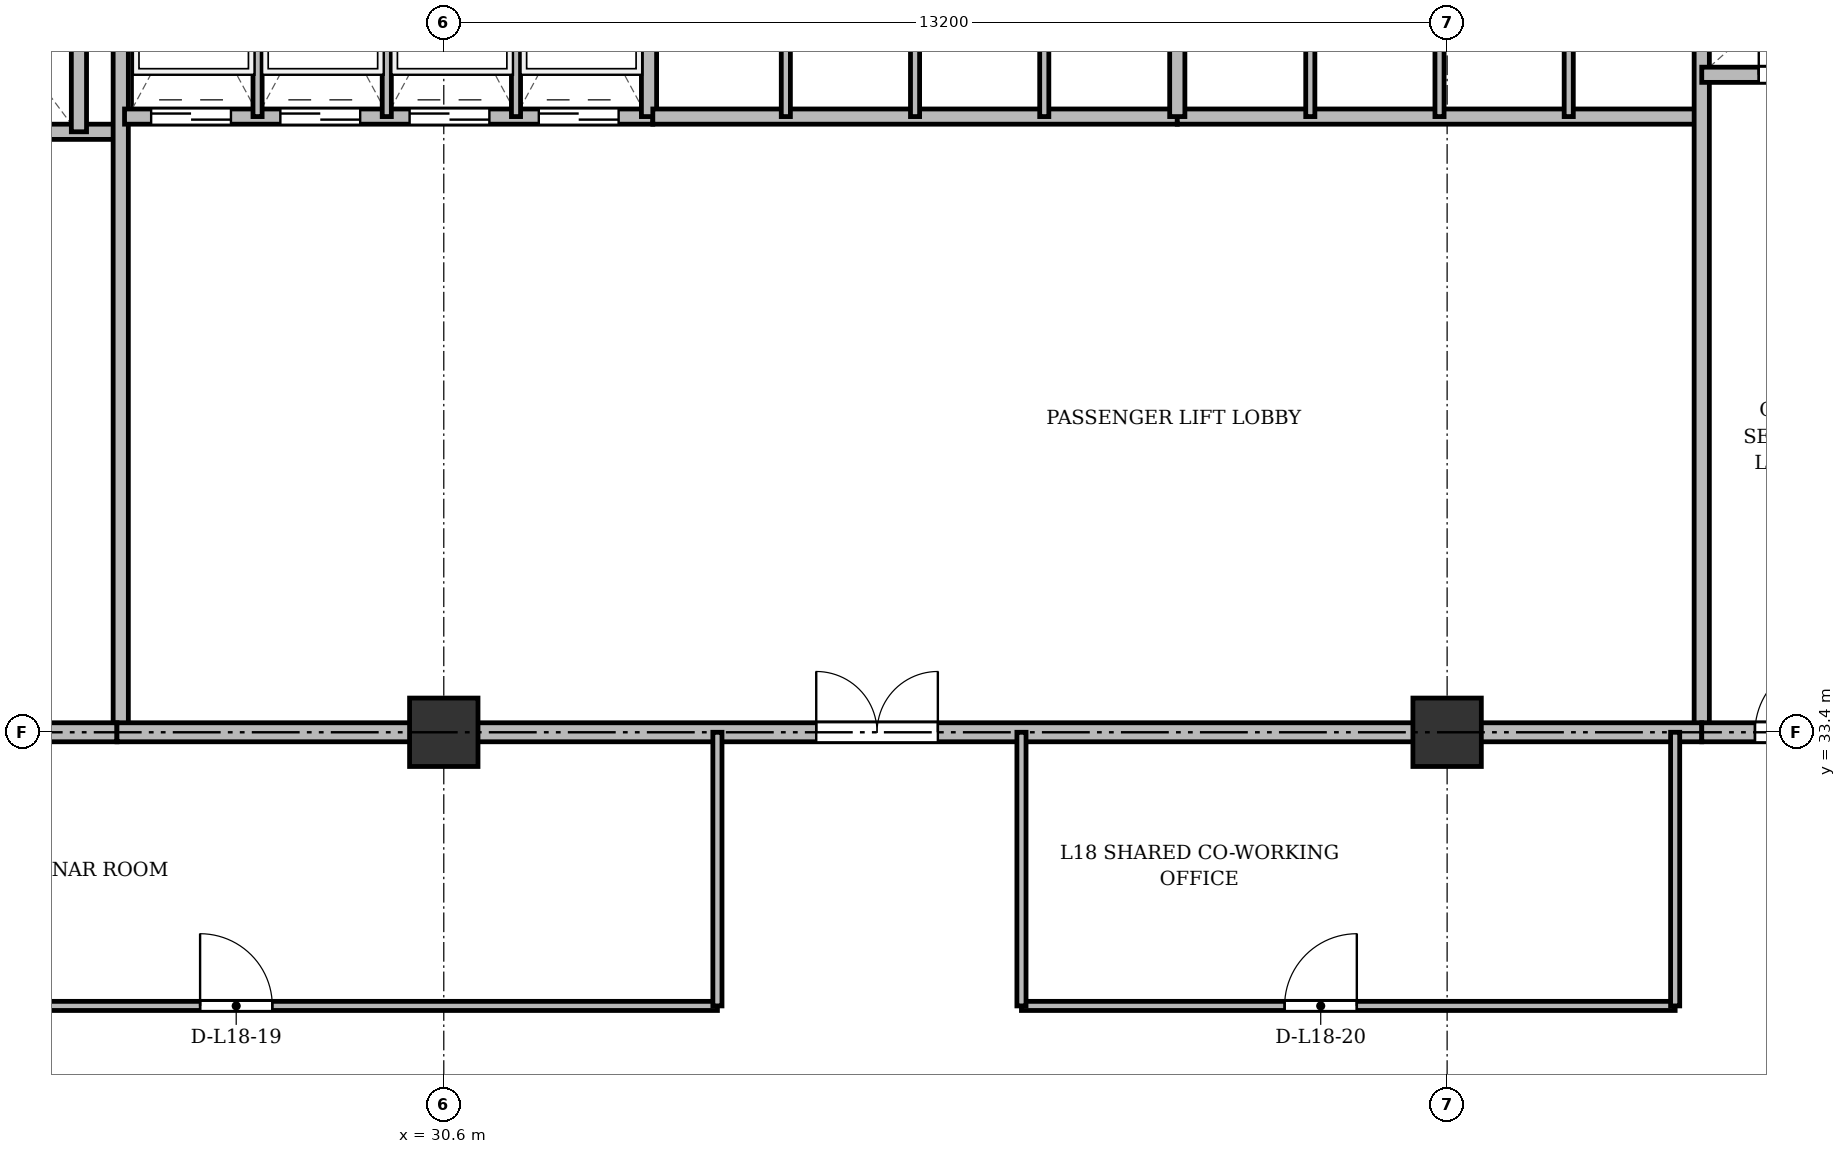
"""IFC4 building model, lengths in metres.
Left out: names, types, materials, properties, quantities, classifications, styles, units other than length and angle.
Written with IfcOpenShell. Run it as: python <this file> out.ifc"""

import sys

from ifc_helpers import new_model, si_unit, direction, frame, frame_2d, origin, origin_2d, place, context, subcontext, project, spatial, rectangle, extrude, source, transform, mapped, element, fill, save


model = new_model("IFC4")
c1 = context("Model", 3, precision=1e-05, world=origin(), true_north=direction((0.0, 1.0)))
c2 = subcontext(c1, "Body", "Model", "MODEL_VIEW")
j1 = project(units=[si_unit("LENGTHUNIT", "METRE"), si_unit("PLANEANGLEUNIT", "RADIAN")], contexts=[c1])
p1 = place(None, origin())
s1 = spatial("IfcSite", under=j1, at=p1, CompositionType="ELEMENT")
p2 = place(p1, origin())
s2 = spatial("IfcBuilding", under=s1, at=p2, CompositionType="ELEMENT")
p3 = place(p2, frame((0.0, 0.0, 70.3)))
s3 = spatial("IfcBuildingStorey", under=s2, at=p3, CompositionType="ELEMENT", Elevation=70.3)
m1 = source(origin(), c2, "Body", "SweptSolid", [
    extrude(rectangle(XDim=0.9, YDim=0.9, at=origin_2d()), origin(), (0.0, 0.0, 1.0), 3.6),
])
for number, where, z_axis, x_axis in (
    (1, (30.6, 33.4, 0.0), (0.0, 0.0, 1.0), (1.0, 0.0, 0.0)),
    (2, (43.8, 33.4, 0.0), (0.0, 0.0, 1.0), (1.0, 0.0, 0.0)),
):
    element("IfcColumn", number, at=place(p3, frame(where, z_axis=z_axis, x_axis=x_axis)), inside=s3, PredefinedType="COLUMN", context=c2, shape_type="MappedRepresentation", body=[
        mapped(m1, transform((0.0, 0.0, 0.0), x_axis=(1.0, 0.0, 0.0), y_axis=(0.0, 1.0, 0.0), z_axis=(0.0, 0.0, 1.0), scale=1.0)),
    ])
p4 = place(p3, frame((19.55, 41.3, 0.0), z_axis=(0.0, 0.0, 1.0), x_axis=(1.0, 0.0, 0.0)))
e3 = element("IfcWall", 3, at=p4, inside=s3, PredefinedType="SOLIDWALL", context=c2, shape_type="SweptSolid", body=[
    extrude(rectangle(XDim=6.75, YDim=0.2, at=frame_2d((3.375, 0.0))), origin(), (0.0, 0.0, 1.0), 3.22),
])
p5 = place(p4, frame((1.7, 0.0, 0.0)))
e4 = element("IfcOpeningElement", 4, at=p5, cuts=e3, PredefinedType="OPENING", context=c2, shape_type="SweptSolid", body=[
    extrude(rectangle(XDim=1.1, YDim=2.15, at=frame_2d((0.55, 1.075))), frame((0.0, 0.11, 0.0), z_axis=(0.0, -1.0, 0.0), x_axis=(1.0, 0.0, 0.0)), (0.0, 0.0, 1.0), 0.22),
])
p6 = place(p4, frame((4.4, 0.0, 0.0)))
e5 = element("IfcOpeningElement", 5, at=p6, cuts=e3, PredefinedType="OPENING", context=c2, shape_type="SweptSolid", body=[
    extrude(rectangle(XDim=1.1, YDim=2.15, at=frame_2d((0.55, 1.075))), frame((0.0, 0.11, 0.0), z_axis=(0.0, -1.0, 0.0), x_axis=(1.0, 0.0, 0.0)), (0.0, 0.0, 1.0), 0.22),
])
p7 = place(p3, frame((25.8, 41.3, 0.0), z_axis=(0.0, 0.0, 1.0), x_axis=(0.0, 1.0, 0.0)))
e6 = element("IfcWall", 6, at=p7, inside=s3, PredefinedType="SOLIDWALL", context=c2, shape_type="SweptSolid", body=[
    extrude(rectangle(XDim=3.4, YDim=0.2, at=frame_2d((1.7, 0.0))), origin(), (0.0, 0.0, 1.0), 3.22),
])
p8 = place(p3, frame((26.35, 33.4, 0.0), z_axis=(0.0, 0.0, 1.0), x_axis=(0.0, 1.0, 0.0)))
e7 = element("IfcWall", 7, at=p8, inside=s3, PredefinedType="SOLIDWALL", context=c2, shape_type="SweptSolid", body=[
    extrude(rectangle(XDim=11.3, YDim=0.2, at=frame_2d((5.65, 0.0))), origin(), (0.0, 0.0, 1.0), 2.57),
])
p9 = place(p3, frame((19.5, 33.4, 0.0), z_axis=(0.0, 0.0, 1.0), x_axis=(1.0, 0.0, 0.0)))
e8 = element("IfcWall", 8, at=p9, inside=s3, PredefinedType="PARTITIONING", context=c2, shape_type="SweptSolid", body=[
    extrude(rectangle(XDim=6.8, YDim=0.25, at=frame_2d((3.4, 0.0))), origin(), (0.0, 0.0, 1.0), 2.57),
])
p10 = place(p9, frame((0.75, 0.0, 0.0)))
e9 = element("IfcOpeningElement", 9, at=p10, cuts=e8, PredefinedType="OPENING", context=c2, shape_type="SweptSolid", body=[
    extrude(rectangle(XDim=1.6, YDim=2.2, at=frame_2d((0.8, 1.1))), frame((0.0, 0.135, 0.0), z_axis=(0.0, -1.0, 0.0), x_axis=(1.0, 0.0, 0.0)), (0.0, 0.0, 1.0), 0.27),
])
p11 = place(p3, frame((26.4, 41.5, 0.0), z_axis=(0.0, 0.0, 1.0), x_axis=(1.0, 0.0, 0.0)))
e10 = element("IfcWall", 10, at=p11, inside=s3, PredefinedType="SOLIDWALL", context=c2, shape_type="SweptSolid", body=[
    extrude(rectangle(XDim=6.95, YDim=0.2, at=frame_2d((3.475, 0.0))), origin(), (0.0, 0.0, 1.0), 3.22),
])
p12 = place(p11, frame((0.35, 0.0, 0.0)))
e11 = element("IfcOpeningElement", 11, at=p12, cuts=e10, PredefinedType="OPENING", context=c2, shape_type="SweptSolid", body=[
    extrude(rectangle(XDim=1.05, YDim=2.15, at=frame_2d((0.525, 1.075))), frame((0.0, 0.11, 0.0), z_axis=(0.0, -1.0, 0.0), x_axis=(1.0, 0.0, 0.0)), (0.0, 0.0, 1.0), 0.22),
])
p13 = place(p11, frame((2.05, 0.0, 0.0)))
e12 = element("IfcOpeningElement", 12, at=p13, cuts=e10, PredefinedType="OPENING", context=c2, shape_type="SweptSolid", body=[
    extrude(rectangle(XDim=1.05, YDim=2.15, at=frame_2d((0.525, 1.075))), frame((0.0, 0.11, 0.0), z_axis=(0.0, -1.0, 0.0), x_axis=(1.0, 0.0, 0.0)), (0.0, 0.0, 1.0), 0.22),
])
p14 = place(p11, frame((3.75, 0.0, 0.0)))
e13 = element("IfcOpeningElement", 13, at=p14, cuts=e10, PredefinedType="OPENING", context=c2, shape_type="SweptSolid", body=[
    extrude(rectangle(XDim=1.05, YDim=2.15, at=frame_2d((0.525, 1.075))), frame((0.0, 0.11, 0.0), z_axis=(0.0, -1.0, 0.0), x_axis=(1.0, 0.0, 0.0)), (0.0, 0.0, 1.0), 0.22),
])
p15 = place(p11, frame((5.45, 0.0, 0.0)))
e14 = element("IfcOpeningElement", 14, at=p15, cuts=e10, PredefinedType="OPENING", context=c2, shape_type="SweptSolid", body=[
    extrude(rectangle(XDim=1.05, YDim=2.15, at=frame_2d((0.525, 1.075))), frame((0.0, 0.11, 0.0), z_axis=(0.0, -1.0, 0.0), x_axis=(1.0, 0.0, 0.0)), (0.0, 0.0, 1.0), 0.22),
])
p16 = place(p3, frame((33.3, 41.5, 0.0), z_axis=(0.0, 0.0, 1.0), x_axis=(0.0, 1.0, 0.0)))
e15 = element("IfcWall", 15, at=p16, inside=s3, PredefinedType="SOLIDWALL", context=c2, shape_type="SweptSolid", body=[
    extrude(rectangle(XDim=3.2, YDim=0.2, at=frame_2d((1.6, 0.0))), origin(), (0.0, 0.0, 1.0), 3.22),
])
for number, where, z_axis, x_axis in (
    (16, (28.15, 41.5, 0.0), (0.0, 0.0, 1.0), (0.0, 1.0, 0.0)),
    (17, (29.85, 41.5, 0.0), (0.0, 0.0, 1.0), (0.0, 1.0, 0.0)),
    (18, (31.55, 41.5, 0.0), (0.0, 0.0, 1.0), (0.0, 1.0, 0.0)),
):
    element("IfcWall", number, at=place(p3, frame(where, z_axis=z_axis, x_axis=x_axis)), inside=s3, PredefinedType="PARTITIONING", context=c2, shape_type="SweptSolid", body=[
        extrude(rectangle(XDim=3.2, YDim=0.12, at=frame_2d((1.6, 0.0))), origin(), (0.0, 0.0, 1.0), 3.22),
    ])
p17 = place(p3, frame((33.35, 41.5, 0.0), z_axis=(0.0, 0.0, 1.0), x_axis=(1.0, 0.0, 0.0)))
e19 = element("IfcWall", 19, at=p17, inside=s3, PredefinedType="SOLIDWALL", context=c2, shape_type="SweptSolid", body=[
    extrude(rectangle(XDim=6.9, YDim=0.2, at=frame_2d((3.45, 0.0))), origin(), (0.0, 0.0, 1.0), 3.22),
])
for number, where, z_axis, x_axis in (
    (20, (35.1, 41.5, 0.0), (0.0, 0.0, 1.0), (0.0, 1.0, 0.0)),
    (21, (36.8, 41.5, 0.0), (0.0, 0.0, 1.0), (0.0, 1.0, 0.0)),
    (22, (38.5, 41.5, 0.0), (0.0, 0.0, 1.0), (0.0, 1.0, 0.0)),
):
    element("IfcWall", number, at=place(p3, frame(where, z_axis=z_axis, x_axis=x_axis)), inside=s3, PredefinedType="PARTITIONING", context=c2, shape_type="SweptSolid", body=[
        extrude(rectangle(XDim=3.2, YDim=0.12, at=frame_2d((1.6, 0.0))), origin(), (0.0, 0.0, 1.0), 3.22),
    ])
p18 = place(p3, frame((40.25, 41.5, 0.0), z_axis=(0.0, 0.0, 1.0), x_axis=(1.0, 0.0, 0.0)))
e23 = element("IfcWall", 23, at=p18, inside=s3, PredefinedType="SOLIDWALL", context=c2, shape_type="SweptSolid", body=[
    extrude(rectangle(XDim=6.9, YDim=0.2, at=frame_2d((3.45, 0.0))), origin(), (0.0, 0.0, 1.0), 2.632),
])
p19 = place(p3, frame((40.25, 41.5, 0.0), z_axis=(0.0, 0.0, 1.0), x_axis=(0.0, 1.0, 0.0)))
e24 = element("IfcWall", 24, at=p19, inside=s3, PredefinedType="SOLIDWALL", context=c2, shape_type="SweptSolid", body=[
    extrude(rectangle(XDim=3.2, YDim=0.2, at=frame_2d((1.6, 0.0))), origin(), (0.0, 0.0, 1.0), 3.22),
])
p20 = place(p3, frame((42.0, 41.5, 0.0), z_axis=(0.0, 0.0, 1.0), x_axis=(0.0, 1.0, 0.0)))
e25 = element("IfcWall", 25, at=p20, inside=s3, PredefinedType="PARTITIONING", context=c2, shape_type="SweptSolid", body=[
    extrude(rectangle(XDim=3.2, YDim=0.12, at=frame_2d((1.6, 0.0))), origin(), (0.0, 0.0, 1.0), 3.22),
])
p21 = place(p3, frame((43.7, 41.5, 0.0), z_axis=(0.0, 0.0, 1.0), x_axis=(0.0, 1.0, 0.0)))
e26 = element("IfcWall", 26, at=p21, inside=s3, PredefinedType="PARTITIONING", context=c2, shape_type="SweptSolid", body=[
    extrude(rectangle(XDim=3.2, YDim=0.12, at=frame_2d((1.6, 0.0))), origin(), (0.0, 0.0, 1.0), 2.632),
])
p22 = place(p3, frame((45.4, 41.5, 0.0), z_axis=(0.0, 0.0, 1.0), x_axis=(0.0, 1.0, 0.0)))
e27 = element("IfcWall", 27, at=p22, inside=s3, PredefinedType="PARTITIONING", context=c2, shape_type="SweptSolid", body=[
    extrude(rectangle(XDim=3.2, YDim=0.12, at=frame_2d((1.6, 0.0))), origin(), (0.0, 0.0, 1.0), 3.22),
])
p23 = place(p3, frame((47.15, 33.4, 0.0), z_axis=(0.0, 0.0, 1.0), x_axis=(0.0, 1.0, 0.0)))
e28 = element("IfcWall", 28, at=p23, inside=s3, PredefinedType="SOLIDWALL", context=c2, shape_type="SweptSolid", body=[
    extrude(rectangle(XDim=11.3, YDim=0.2, at=frame_2d((5.65, 0.0))), origin(), (0.0, 0.0, 1.0), 2.57),
])
p24 = place(p3, frame((26.3, 33.4, 0.0), z_axis=(0.0, 0.0, 1.0), x_axis=(1.0, 0.0, 0.0)))
e29 = element("IfcWall", 29, at=p24, inside=s3, PredefinedType="PARTITIONING", context=c2, shape_type="SweptSolid", body=[
    extrude(rectangle(XDim=20.85, YDim=0.25, at=frame_2d((10.425, 0.0))), origin(), (0.0, 0.0, 1.0), 2.57),
])
p25 = place(p24, frame((9.2, 0.0, 0.0)))
e30 = element("IfcOpeningElement", 30, at=p25, cuts=e29, PredefinedType="OPENING", context=c2, shape_type="SweptSolid", body=[
    extrude(rectangle(XDim=1.6, YDim=2.2, at=frame_2d((0.8, 1.1))), frame((0.0, 0.135, 0.0), z_axis=(0.0, -1.0, 0.0), x_axis=(1.0, 0.0, 0.0)), (0.0, 0.0, 1.0), 0.27),
])
p26 = place(p3, frame((47.15, 42.05, 0.0), z_axis=(0.0, 0.0, 1.0), x_axis=(1.0, 0.0, 0.0)))
e31 = element("IfcWall", 31, at=p26, inside=s3, PredefinedType="SOLIDWALL", context=c2, shape_type="SweptSolid", body=[
    extrude(rectangle(XDim=7.85, YDim=0.2, at=frame_2d((3.925, 0.0))), origin(), (0.0, 0.0, 1.0), 2.632),
])
p27 = place(p26, frame((0.75, 0.0, 0.0)))
e32 = element("IfcOpeningElement", 32, at=p27, cuts=e31, PredefinedType="OPENING", context=c2, shape_type="SweptSolid", body=[
    extrude(rectangle(XDim=0.9, YDim=2.1, at=frame_2d((0.45, 1.05))), frame((0.0, 0.11, 0.0), z_axis=(0.0, -1.0, 0.0), x_axis=(1.0, 0.0, 0.0)), (0.0, 0.0, 1.0), 0.22),
])
p28 = place(p26, frame((3.85, 0.0, 0.0)))
e33 = element("IfcOpeningElement", 33, at=p28, cuts=e31, PredefinedType="OPENING", context=c2, shape_type="SweptSolid", body=[
    extrude(rectangle(XDim=0.9, YDim=2.1, at=frame_2d((0.45, 1.05))), frame((0.0, 0.11, 0.0), z_axis=(0.0, -1.0, 0.0), x_axis=(1.0, 0.0, 0.0)), (0.0, 0.0, 1.0), 0.22),
])
p29 = place(p3, frame((47.15, 33.4, 0.0), z_axis=(0.0, 0.0, 1.0), x_axis=(1.0, 0.0, 0.0)))
e34 = element("IfcWall", 34, at=p29, inside=s3, PredefinedType="PARTITIONING", context=c2, shape_type="SweptSolid", body=[
    extrude(rectangle(XDim=11.15, YDim=0.25, at=frame_2d((5.575, 0.0))), origin(), (0.0, 0.0, 1.0), 2.57),
])
p30 = place(p29, frame((0.7, 0.0, 0.0)))
e35 = element("IfcOpeningElement", 35, at=p30, cuts=e34, PredefinedType="OPENING", context=c2, shape_type="SweptSolid", body=[
    extrude(rectangle(XDim=0.95, YDim=2.15, at=frame_2d((0.475, 1.075))), frame((0.0, 0.135, 0.0), z_axis=(0.0, -1.0, 0.0), x_axis=(1.0, 0.0, 0.0)), (0.0, 0.0, 1.0), 0.27),
])
p31 = place(p29, frame((6.0, 0.0, 0.0)))
e36 = element("IfcOpeningElement", 36, at=p31, cuts=e34, PredefinedType="OPENING", context=c2, shape_type="SweptSolid", body=[
    extrude(rectangle(XDim=1.2, YDim=2.15, at=frame_2d((0.6, 1.075))), frame((0.0, 0.135, 0.0), z_axis=(0.0, -1.0, 0.0), x_axis=(1.0, 0.0, 0.0)), (0.0, 0.0, 1.0), 0.27),
])
p32 = place(p3, frame((22.45, 29.8, 0.0), z_axis=(0.0, 0.0, 1.0), x_axis=(1.0, 0.0, 0.0)))
e37 = element("IfcWall", 37, at=p32, inside=s3, PredefinedType="PARTITIONING", context=c2, shape_type="SweptSolid", body=[
    extrude(rectangle(XDim=11.75, YDim=0.12, at=frame_2d((5.875, 0.0))), origin(), (0.0, 0.0, 1.0), 2.632),
])
p33 = place(p32, frame((4.944, 0.0, 0.0)))
e38 = element("IfcOpeningElement", 38, at=p33, cuts=e37, PredefinedType="OPENING", context=c2, shape_type="SweptSolid", body=[
    extrude(rectangle(XDim=0.95, YDim=2.15, at=frame_2d((0.475, 1.075))), frame((0.0, 0.07, 0.0), z_axis=(0.0, -1.0, 0.0), x_axis=(1.0, 0.0, 0.0)), (0.0, 0.0, 1.0), 0.14),
])
p34 = place(p3, frame((38.2, 29.8, 0.0), z_axis=(0.0, 0.0, 1.0), x_axis=(1.0, 0.0, 0.0)))
e39 = element("IfcWall", 39, at=p34, inside=s3, PredefinedType="PARTITIONING", context=c2, shape_type="SweptSolid", body=[
    extrude(rectangle(XDim=8.6, YDim=0.12, at=frame_2d((4.3, 0.0))), origin(), (0.0, 0.0, 1.0), 2.632),
])
p35 = place(p34, frame((3.462, 0.0, 0.0)))
e40 = element("IfcOpeningElement", 40, at=p35, cuts=e39, PredefinedType="OPENING", context=c2, shape_type="SweptSolid", body=[
    extrude(rectangle(XDim=0.95, YDim=2.15, at=frame_2d((0.475, 1.075))), frame((0.0, 0.07, 0.0), z_axis=(0.0, -1.0, 0.0), x_axis=(1.0, 0.0, 0.0)), (0.0, 0.0, 1.0), 0.14),
])
for number, where, z_axis, x_axis in (
    (41, (34.2, 29.8, 0.0), (0.0, 0.0, 1.0), (0.0, 1.0, 0.0)),
    (42, (38.2, 29.8, 0.0), (0.0, 0.0, 1.0), (0.0, 1.0, 0.0)),
    (43, (46.8, 29.8, 0.0), (0.0, 0.0, 1.0), (0.0, 1.0, 0.0)),
):
    element("IfcWall", number, at=place(p3, frame(where, z_axis=z_axis, x_axis=x_axis)), inside=s3, PredefinedType="PARTITIONING", context=c2, shape_type="SweptSolid", body=[
        extrude(rectangle(XDim=3.6, YDim=0.12, at=frame_2d((1.8, 0.0))), origin(), (0.0, 0.0, 1.0), 2.57),
    ])
m2 = source(origin(), c2, "Body", "SweptSolid", [
    extrude(rectangle(XDim=1.05, YDim=2.15, at=frame_2d((0.525, 1.075))), frame((0.0, 0.025, 0.0), z_axis=(0.0, -1.0, 0.0), x_axis=(1.0, 0.0, 0.0)), (0.0, 0.0, 1.0), 0.05),
])
p36 = place(p12, origin())
e44 = element("IfcDoor", 44, at=p36, inside=s3, OperationType="DOUBLE_DOOR_SLIDING", PredefinedType="DOOR", context=c2, shape_type="MappedRepresentation", body=[
    mapped(m2, transform((0.0, 0.0, 0.0), x_axis=(1.0, 0.0, 0.0), y_axis=(0.0, 1.0, 0.0), z_axis=(0.0, 0.0, 1.0), scale=1.0)),
])
fill(e11, e44)
p37 = place(p13, origin())
e45 = element("IfcDoor", 45, at=p37, inside=s3, OperationType="DOUBLE_DOOR_SLIDING", PredefinedType="DOOR", context=c2, shape_type="MappedRepresentation", body=[
    mapped(m2, transform((0.0, 0.0, 0.0), x_axis=(1.0, 0.0, 0.0), y_axis=(0.0, 1.0, 0.0), z_axis=(0.0, 0.0, 1.0), scale=1.0)),
])
fill(e12, e45)
p38 = place(p14, origin())
e46 = element("IfcDoor", 46, at=p38, inside=s3, OperationType="DOUBLE_DOOR_SLIDING", PredefinedType="DOOR", context=c2, shape_type="MappedRepresentation", body=[
    mapped(m2, transform((0.0, 0.0, 0.0), x_axis=(1.0, 0.0, 0.0), y_axis=(0.0, 1.0, 0.0), z_axis=(0.0, 0.0, 1.0), scale=1.0)),
])
fill(e13, e46)
p39 = place(p15, origin())
e47 = element("IfcDoor", 47, at=p39, inside=s3, OperationType="DOUBLE_DOOR_SLIDING", PredefinedType="DOOR", context=c2, shape_type="MappedRepresentation", body=[
    mapped(m2, transform((0.0, 0.0, 0.0), x_axis=(1.0, 0.0, 0.0), y_axis=(0.0, 1.0, 0.0), z_axis=(0.0, 0.0, 1.0), scale=1.0)),
])
fill(e14, e47)
m3 = source(origin(), c2, "Body", "SweptSolid", [
    extrude(rectangle(XDim=1.6, YDim=2.2, at=frame_2d((0.8, 1.1))), frame((0.0, 0.025, 0.0), z_axis=(0.0, -1.0, 0.0), x_axis=(1.0, 0.0, 0.0)), (0.0, 0.0, 1.0), 0.05),
])
p40 = place(p25, origin())
e48 = element("IfcDoor", 48, at=p40, inside=s3, OperationType="DOUBLE_DOOR_SINGLE_SWING", PredefinedType="DOOR", context=c2, shape_type="MappedRepresentation", body=[
    mapped(m3, transform((0.0, 0.0, 0.0), x_axis=(1.0, 0.0, 0.0), y_axis=(0.0, 1.0, 0.0), z_axis=(0.0, 0.0, 1.0), scale=1.0)),
])
fill(e30, e48)
m4 = source(origin(), c2, "Body", "SweptSolid", [
    extrude(rectangle(XDim=0.9, YDim=2.1, at=frame_2d((0.45, 1.05))), frame((0.0, 0.025, 0.0), z_axis=(0.0, -1.0, 0.0), x_axis=(1.0, 0.0, 0.0)), (0.0, 0.0, 1.0), 0.05),
])
p41 = place(p27, origin())
e49 = element("IfcDoor", 49, at=p41, inside=s3, OperationType="SINGLE_SWING_LEFT", PredefinedType="DOOR", context=c2, shape_type="MappedRepresentation", body=[
    mapped(m4, transform((0.0, 0.0, 0.0), x_axis=(1.0, 0.0, 0.0), y_axis=(0.0, 1.0, 0.0), z_axis=(0.0, 0.0, 1.0), scale=1.0)),
])
fill(e32, e49)
m5 = source(origin(), c2, "Body", "SweptSolid", [
    extrude(rectangle(XDim=0.95, YDim=2.15, at=frame_2d((0.475, 1.075))), frame((0.0, 0.025, 0.0), z_axis=(0.0, -1.0, 0.0), x_axis=(1.0, 0.0, 0.0)), (0.0, 0.0, 1.0), 0.05),
])
p42 = place(p30, origin())
e50 = element("IfcDoor", 50, at=p42, inside=s3, OperationType="SINGLE_SWING_RIGHT", PredefinedType="DOOR", context=c2, shape_type="MappedRepresentation", body=[
    mapped(m5, transform((0.0, 0.0, 0.0), x_axis=(1.0, 0.0, 0.0), y_axis=(0.0, 1.0, 0.0), z_axis=(0.0, 0.0, 1.0), scale=1.0)),
])
fill(e35, e50)
p43 = place(p33, origin())
e51 = element("IfcDoor", 51, at=p43, inside=s3, OperationType="SINGLE_SWING_LEFT", PredefinedType="DOOR", context=c2, shape_type="MappedRepresentation", body=[
    mapped(m5, transform((0.0, 0.0, 0.0), x_axis=(1.0, 0.0, 0.0), y_axis=(0.0, 1.0, 0.0), z_axis=(0.0, 0.0, 1.0), scale=1.0)),
])
fill(e38, e51)
p44 = place(p35, origin())
e52 = element("IfcDoor", 52, at=p44, inside=s3, OperationType="SINGLE_SWING_RIGHT", PredefinedType="DOOR", context=c2, shape_type="MappedRepresentation", body=[
    mapped(m5, transform((0.0, 0.0, 0.0), x_axis=(1.0, 0.0, 0.0), y_axis=(0.0, 1.0, 0.0), z_axis=(0.0, 0.0, 1.0), scale=1.0)),
])
fill(e40, e52)
save(model, sys.argv[1])
